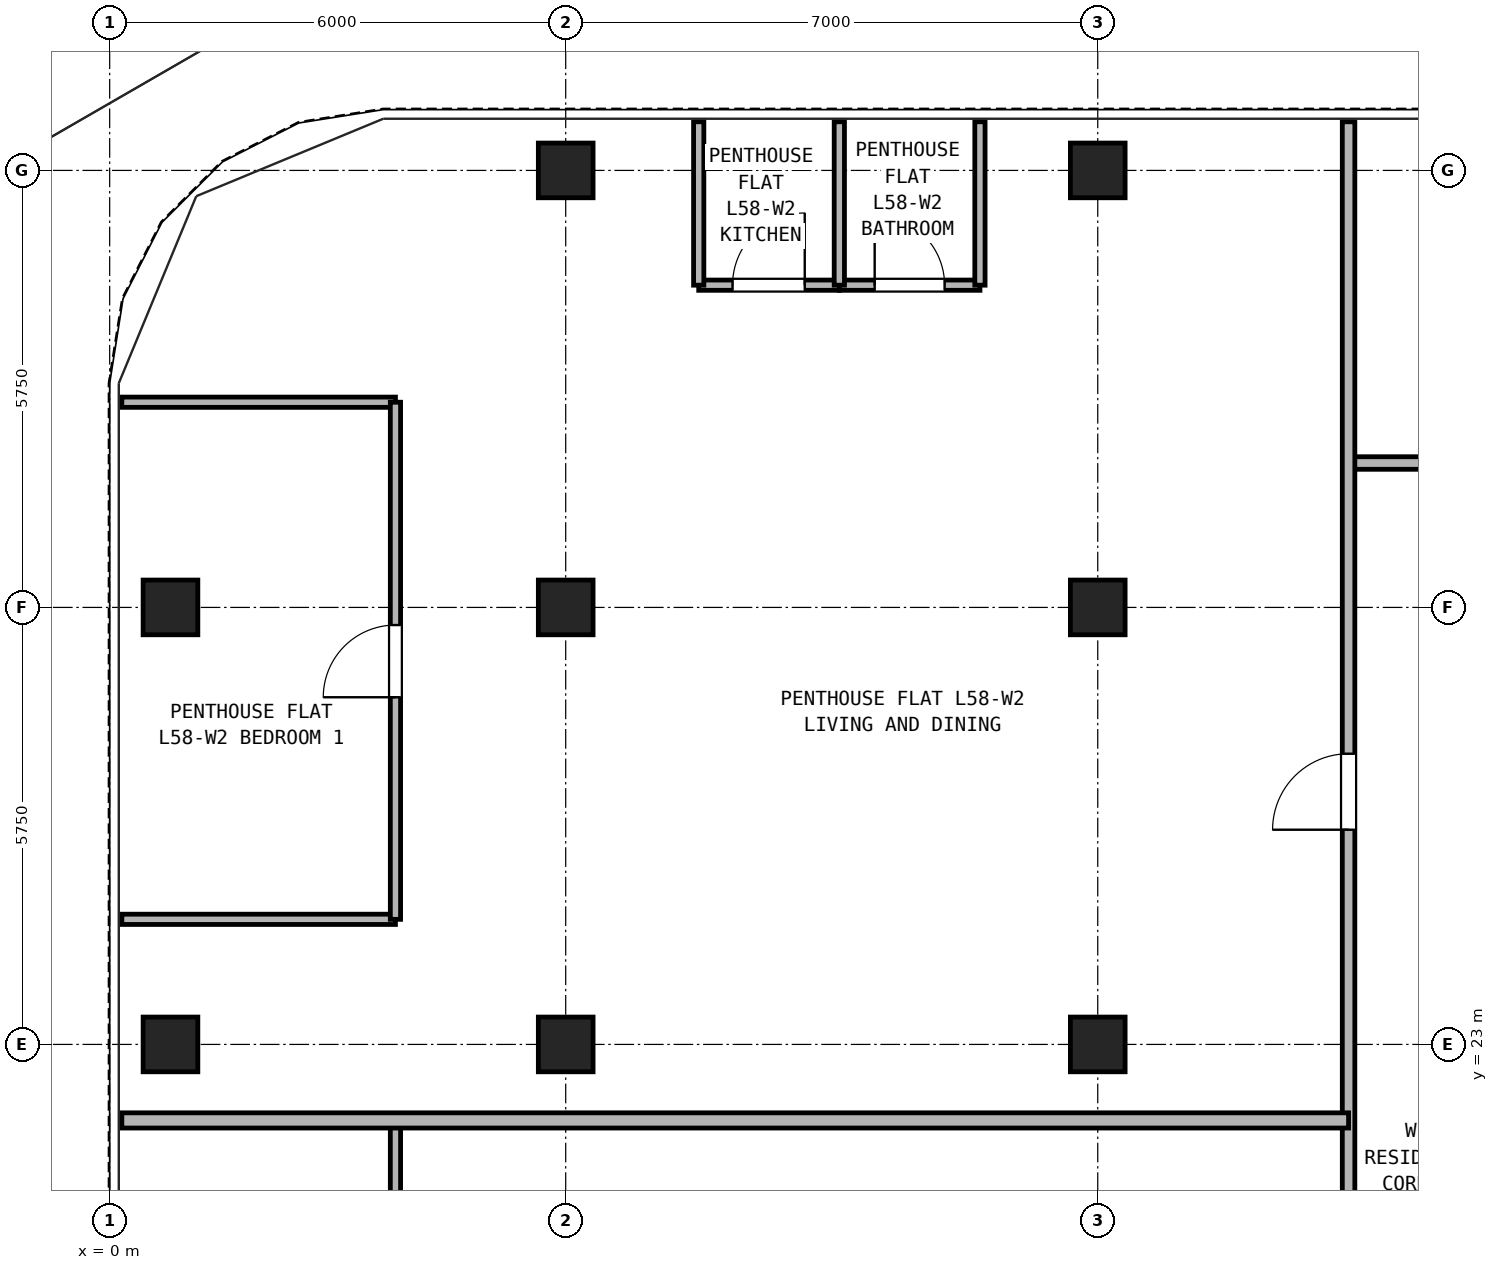
"""IFC4 building model, lengths in metres.
Left out: names, types, materials, properties, quantities, classifications, styles, units other than length and angle.
Written with IfcOpenShell. Run it as: python <this file> out.ifc"""

import sys

from ifc_helpers import new_model, si_unit, direction, frame, frame_2d, origin, origin_2d, place, context, subcontext, project, spatial, rectangle, hollow_rectangle, extrude, source, transform, mapped, element, fill, save


model = new_model("IFC4")
c1 = context("Model", 3, precision=1e-05, world=origin(), true_north=direction((0.0, 1.0)))
c2 = subcontext(c1, "Body", "Model", "MODEL_VIEW")
j1 = project(units=[si_unit("LENGTHUNIT", "METRE"), si_unit("PLANEANGLEUNIT", "RADIAN")], contexts=[c1])
p1 = place(None, origin())
s1 = spatial("IfcSite", under=j1, at=p1, CompositionType="ELEMENT")
p2 = place(p1, origin())
s2 = spatial("IfcBuilding", under=s1, at=p2, CompositionType="ELEMENT")
p3 = place(p2, frame((0.0, 0.0, 206.0)))
s3 = spatial("IfcBuildingStorey", under=s2, at=p3, CompositionType="ELEMENT", Elevation=206.0)
m1 = source(origin(), c2, "Body", "SweptSolid", [
    extrude(hollow_rectangle(XDim=0.72, YDim=0.72, WallThickness=0.04, at=origin_2d()), origin(), (0.0, 0.0, 1.0), 2.95),
])
for number, where, z_axis, x_axis in (
    (1, (6.0, 34.5, 0.0), (0.0, 0.0, 1.0), (1.0, 0.0, 0.0)),
    (2, (13.0, 34.5, 0.0), (0.0, 0.0, 1.0), (1.0, 0.0, 0.0)),
    (3, (0.8, 23.0, 0.0), (0.0, 0.0, 1.0), (1.0, 0.0, 0.0)),
    (4, (0.8, 28.75, 0.0), (0.0, 0.0, 1.0), (1.0, 0.0, 0.0)),
    (5, (6.0, 23.0, 0.0), (0.0, 0.0, 1.0), (1.0, 0.0, 0.0)),
    (6, (6.0, 28.75, 0.0), (0.0, 0.0, 1.0), (1.0, 0.0, 0.0)),
    (7, (13.0, 23.0, 0.0), (0.0, 0.0, 1.0), (1.0, 0.0, 0.0)),
    (8, (13.0, 28.75, 0.0), (0.0, 0.0, 1.0), (1.0, 0.0, 0.0)),
):
    element("IfcColumn", number, at=place(p3, frame(where, z_axis=z_axis, x_axis=x_axis)), inside=s3, PredefinedType="COLUMN", context=c2, shape_type="MappedRepresentation", body=[
        mapped(m1, transform((0.0, 0.0, 0.0), x_axis=(1.0, 0.0, 0.0), y_axis=(0.0, 1.0, 0.0), z_axis=(0.0, 0.0, 1.0), scale=1.0)),
    ])
p4 = place(p3, frame((16.3, 30.65, 0.0), z_axis=(0.0, 0.0, 1.0), x_axis=(1.0, 0.0, 0.0)))
e9 = element("IfcWall", 9, at=p4, inside=s3, PredefinedType="PARTITIONING", context=c2, shape_type="SweptSolid", body=[
    extrude(rectangle(XDim=14.4, YDim=0.165, at=frame_2d((7.2, 0.0))), origin(), (0.0, 0.0, 1.0), 2.95),
])
p5 = place(p4, frame((3.1, 0.0, 0.0)))
e10 = element("IfcOpeningElement", 10, at=p5, cuts=e9, PredefinedType="OPENING", context=c2, shape_type="SweptSolid", body=[
    extrude(rectangle(XDim=0.95, YDim=2.15, at=frame_2d((0.475, 1.075))), frame((0.0, 0.093, 0.0), z_axis=(0.0, -1.0, 0.0), x_axis=(1.0, 0.0, 0.0)), (0.0, 0.0, 1.0), 0.185),
])
p6 = place(p4, frame((8.0, 0.0, 0.0)))
e11 = element("IfcOpeningElement", 11, at=p6, cuts=e9, PredefinedType="OPENING", context=c2, shape_type="SweptSolid", body=[
    extrude(rectangle(XDim=0.95, YDim=2.15, at=frame_2d((0.475, 1.075))), frame((0.0, 0.093, 0.0), z_axis=(0.0, -1.0, 0.0), x_axis=(1.0, 0.0, 0.0)), (0.0, 0.0, 1.0), 0.185),
])
p7 = place(p4, frame((11.6, 0.0, 0.0)))
e12 = element("IfcOpeningElement", 12, at=p7, cuts=e9, PredefinedType="OPENING", context=c2, shape_type="SweptSolid", body=[
    extrude(rectangle(XDim=0.92, YDim=2.1, at=frame_2d((0.46, 1.05))), frame((0.0, 0.093, 0.0), z_axis=(0.0, -1.0, 0.0), x_axis=(1.0, 0.0, 0.0)), (0.0, 0.0, 1.0), 0.185),
])
p8 = place(p3, frame((16.3, 11.35, 0.0), z_axis=(0.0, 0.0, 1.0), x_axis=(0.0, 1.0, 0.0)))
e13 = element("IfcWall", 13, at=p8, inside=s3, PredefinedType="PARTITIONING", context=c2, shape_type="SweptSolid", body=[
    extrude(rectangle(XDim=23.79, YDim=0.165, at=frame_2d((11.895, 0.0))), origin(), (0.0, 0.0, 1.0), 2.95),
])
p9 = place(p8, frame((4.825, 0.0, 0.0)))
e14 = element("IfcOpeningElement", 14, at=p9, cuts=e13, PredefinedType="OPENING", context=c2, shape_type="SweptSolid", body=[
    extrude(rectangle(XDim=1.0, YDim=2.15, at=frame_2d((0.5, 1.075))), frame((0.0, 0.093, 0.0), z_axis=(0.0, -1.0, 0.0), x_axis=(1.0, 0.0, 0.0)), (0.0, 0.0, 1.0), 0.185),
])
p10 = place(p8, frame((14.475, 0.0, 0.0)))
e15 = element("IfcOpeningElement", 15, at=p10, cuts=e13, PredefinedType="OPENING", context=c2, shape_type="SweptSolid", body=[
    extrude(rectangle(XDim=1.0, YDim=2.15, at=frame_2d((0.5, 1.075))), frame((0.0, 0.093, 0.0), z_axis=(0.0, -1.0, 0.0), x_axis=(1.0, 0.0, 0.0)), (0.0, 0.0, 1.0), 0.185),
])
p11 = place(p3, frame((3.76, 18.6, 0.0), z_axis=(0.0, 0.0, 1.0), x_axis=(0.0, 1.0, 0.0)))
e16 = element("IfcWall", 16, at=p11, inside=s3, PredefinedType="PARTITIONING", context=c2, shape_type="SweptSolid", body=[
    extrude(rectangle(XDim=3.4, YDim=0.135, at=frame_2d((1.7, 0.0))), origin(), (0.0, 0.0, 1.0), 2.95),
])
p12 = place(p11, frame((1.22, 0.0, 0.0)))
e17 = element("IfcOpeningElement", 17, at=p12, cuts=e16, PredefinedType="OPENING", context=c2, shape_type="SweptSolid", body=[
    extrude(rectangle(XDim=0.95, YDim=2.15, at=frame_2d((0.475, 1.075))), frame((0.0, 0.077, 0.0), z_axis=(0.0, -1.0, 0.0), x_axis=(1.0, 0.0, 0.0)), (0.0, 0.0, 1.0), 0.155),
])
p13 = place(p3, frame((0.16, 22.0, 0.0), z_axis=(0.0, 0.0, 1.0), x_axis=(1.0, 0.0, 0.0)))
e18 = element("IfcWall", 18, at=p13, inside=s3, PredefinedType="PARTITIONING", context=c2, shape_type="SweptSolid", body=[
    extrude(rectangle(XDim=16.14, YDim=0.2, at=frame_2d((8.07, 0.0))), origin(), (0.0, 0.0, 1.0), 2.95),
])
p14 = place(p3, frame((7.75, 32.99, 0.0), z_axis=(0.0, 0.0, 1.0), x_axis=(1.0, 0.0, 0.0)))
e19 = element("IfcWall", 19, at=p14, inside=s3, PredefinedType="PARTITIONING", context=c2, shape_type="SweptSolid", body=[
    extrude(rectangle(XDim=1.85, YDim=0.135, at=frame_2d((0.925, 0.0))), origin(), (0.0, 0.0, 1.0), 2.95),
])
p15 = place(p14, frame((0.445, 0.0, 0.0)))
e20 = element("IfcOpeningElement", 20, at=p15, cuts=e19, PredefinedType="OPENING", context=c2, shape_type="SweptSolid", body=[
    extrude(rectangle(XDim=0.95, YDim=2.15, at=frame_2d((0.475, 1.075))), frame((0.0, 0.077, 0.0), z_axis=(0.0, -1.0, 0.0), x_axis=(1.0, 0.0, 0.0)), (0.0, 0.0, 1.0), 0.155),
])
p16 = place(p3, frame((9.6, 32.99, 0.0), z_axis=(0.0, 0.0, 1.0), x_axis=(1.0, 0.0, 0.0)))
e21 = element("IfcWall", 21, at=p16, inside=s3, PredefinedType="PARTITIONING", context=c2, shape_type="SweptSolid", body=[
    extrude(rectangle(XDim=1.85, YDim=0.135, at=frame_2d((0.925, 0.0))), origin(), (0.0, 0.0, 1.0), 2.95),
])
p17 = place(p16, frame((0.465, 0.0, 0.0)))
e22 = element("IfcOpeningElement", 22, at=p17, cuts=e21, PredefinedType="OPENING", context=c2, shape_type="SweptSolid", body=[
    extrude(rectangle(XDim=0.92, YDim=2.1, at=frame_2d((0.46, 1.05))), frame((0.0, 0.077, 0.0), z_axis=(0.0, -1.0, 0.0), x_axis=(1.0, 0.0, 0.0)), (0.0, 0.0, 1.0), 0.155),
])
for number, where, z_axis, x_axis in (
    (23, (7.75, 32.99, 0.0), (0.0, 0.0, 1.0), (0.0, 1.0, 0.0)),
    (24, (9.6, 32.99, 0.0), (0.0, 0.0, 1.0), (0.0, 1.0, 0.0)),
    (25, (11.45, 32.99, 0.0), (0.0, 0.0, 1.0), (0.0, 1.0, 0.0)),
):
    element("IfcWall", number, at=place(p3, frame(where, z_axis=z_axis, x_axis=x_axis)), inside=s3, PredefinedType="PARTITIONING", context=c2, shape_type="SweptSolid", body=[
        extrude(rectangle(XDim=2.15, YDim=0.135, at=frame_2d((1.075, 0.0))), origin(), (0.0, 0.0, 1.0), 2.95),
    ])
for number, where, z_axis, x_axis in (
    (26, (0.16, 24.646, 0.0), (0.0, 0.0, 1.0), (1.0, 0.0, 0.0)),
    (27, (0.16, 31.45, 0.0), (0.0, 0.0, 1.0), (1.0, 0.0, 0.0)),
):
    element("IfcWall", number, at=place(p3, frame(where, z_axis=z_axis, x_axis=x_axis)), inside=s3, PredefinedType="PARTITIONING", context=c2, shape_type="SweptSolid", body=[
        extrude(rectangle(XDim=3.6, YDim=0.135, at=frame_2d((1.8, 0.0))), origin(), (0.0, 0.0, 1.0), 2.95),
    ])
p18 = place(p3, frame((3.76, 24.646, 0.0), z_axis=(0.0, 0.0, 1.0), x_axis=(0.0, 1.0, 0.0)))
e28 = element("IfcWall", 28, at=p18, inside=s3, PredefinedType="PARTITIONING", context=c2, shape_type="SweptSolid", body=[
    extrude(rectangle(XDim=6.804, YDim=0.135, at=frame_2d((3.402, 0.0))), origin(), (0.0, 0.0, 1.0), 2.95),
])
p19 = place(p18, frame((2.922, 0.0, 0.0)))
e29 = element("IfcOpeningElement", 29, at=p19, cuts=e28, PredefinedType="OPENING", context=c2, shape_type="SweptSolid", body=[
    extrude(rectangle(XDim=0.95, YDim=2.15, at=frame_2d((0.475, 1.075))), frame((0.0, 0.077, 0.0), z_axis=(0.0, -1.0, 0.0), x_axis=(1.0, 0.0, 0.0)), (0.0, 0.0, 1.0), 0.155),
])
p20 = place(p15, frame((0.95, 0.0, 0.0), z_axis=(0.0, 0.0, 1.0), x_axis=(-1.0, 0.0, 0.0)))
e30 = element("IfcDoor", 30, at=p20, inside=s3, OperationType="SINGLE_SWING_RIGHT", PredefinedType="DOOR", context=c2, shape_type="SweptSolid", body=[
    extrude(rectangle(XDim=0.95, YDim=2.15, at=frame_2d((0.475, 1.075))), frame((0.0, 0.025, 0.0), z_axis=(0.0, -1.0, 0.0), x_axis=(1.0, 0.0, 0.0)), (0.0, 0.0, 1.0), 0.05),
])
fill(e20, e30)
p21 = place(p17, frame((0.92, 0.0, 0.0), z_axis=(0.0, 0.0, 1.0), x_axis=(-1.0, 0.0, 0.0)))
e31 = element("IfcDoor", 31, at=p21, inside=s3, OperationType="SINGLE_SWING_LEFT", PredefinedType="DOOR", context=c2, shape_type="SweptSolid", body=[
    extrude(rectangle(XDim=0.92, YDim=2.1, at=frame_2d((0.46, 1.05))), frame((0.0, 0.025, 0.0), z_axis=(0.0, -1.0, 0.0), x_axis=(1.0, 0.0, 0.0)), (0.0, 0.0, 1.0), 0.05),
])
fill(e22, e31)
p22 = place(p19, origin())
e32 = element("IfcDoor", 32, at=p22, inside=s3, OperationType="SINGLE_SWING_LEFT", PredefinedType="DOOR", context=c2, shape_type="SweptSolid", body=[
    extrude(rectangle(XDim=0.95, YDim=2.15, at=frame_2d((0.475, 1.075))), frame((0.0, 0.025, 0.0), z_axis=(0.0, -1.0, 0.0), x_axis=(1.0, 0.0, 0.0)), (0.0, 0.0, 1.0), 0.05),
])
fill(e29, e32)
p23 = place(p10, origin())
e33 = element("IfcDoor", 33, at=p23, inside=s3, OperationType="SINGLE_SWING_LEFT", PredefinedType="DOOR", context=c2, shape_type="SweptSolid", body=[
    extrude(rectangle(XDim=1.0, YDim=2.15, at=frame_2d((0.5, 1.075))), frame((0.0, 0.025, 0.0), z_axis=(0.0, -1.0, 0.0), x_axis=(1.0, 0.0, 0.0)), (0.0, 0.0, 1.0), 0.05),
])
fill(e15, e33)
save(model, sys.argv[1])
